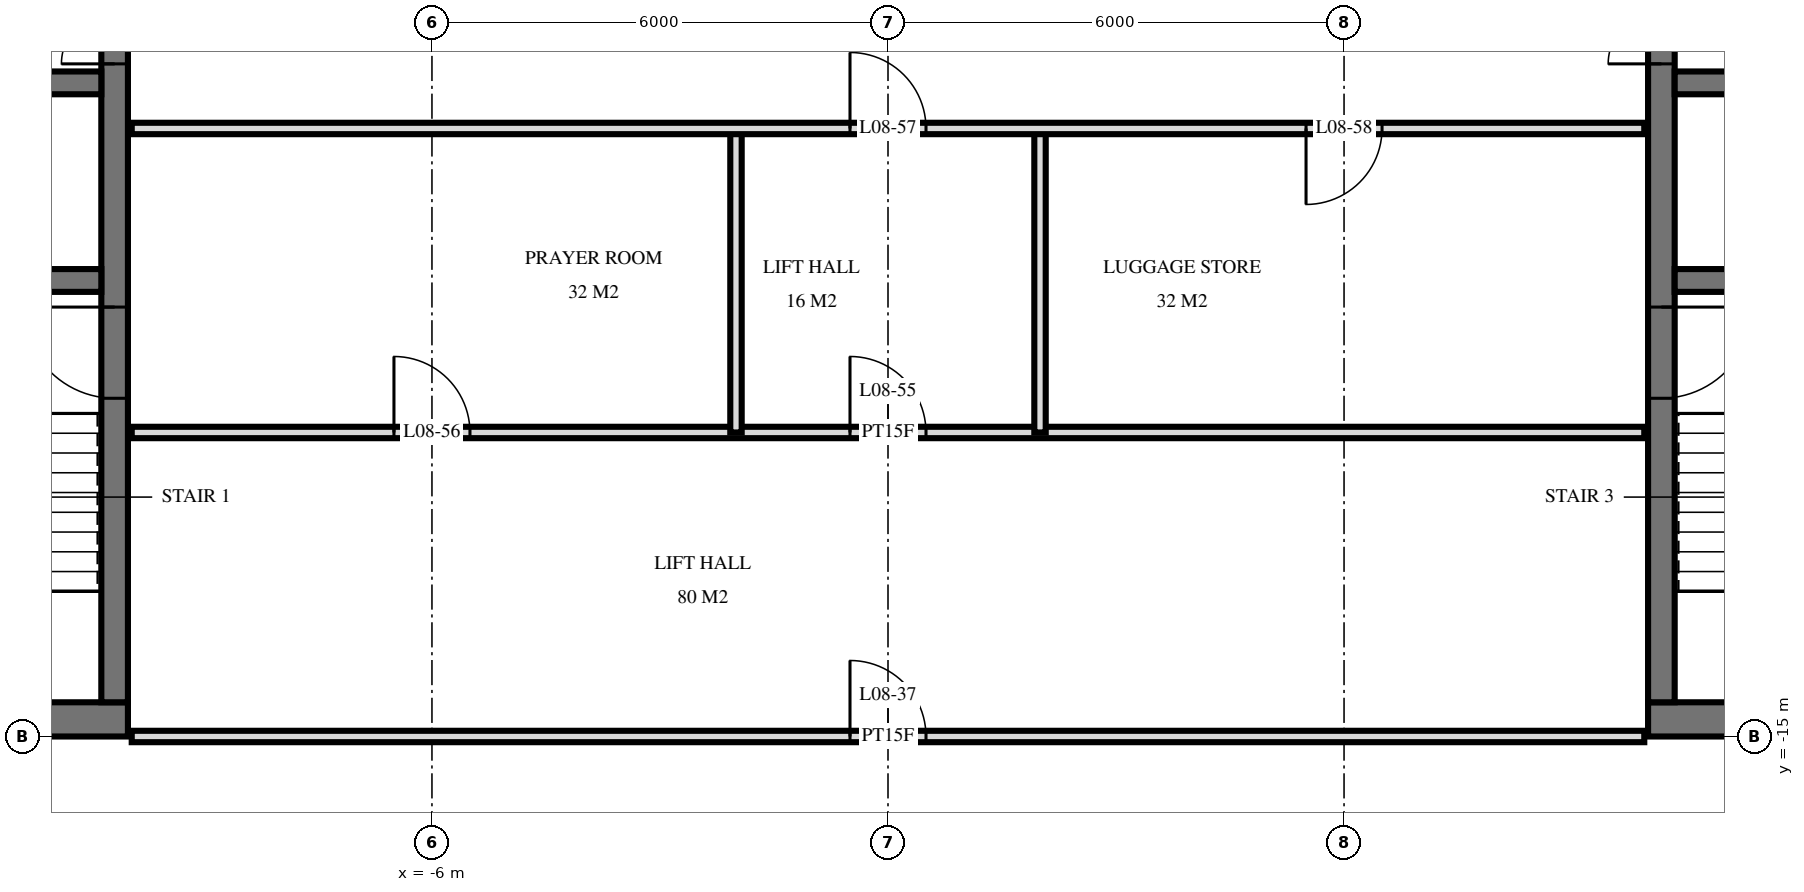
"""IFC4 building model, lengths in metres.
Left out: names, types, materials, properties, quantities, classifications, styles, units other than length and angle.
Written with IfcOpenShell. Run it as: python <this file> out.ifc"""

import sys

from ifc_helpers import new_model, si_unit, direction, frame, frame_2d, origin, place, context, subcontext, project, spatial, rectangle, extrude, element, fill, save


model = new_model("IFC4")
c1 = context("Model", 3, precision=1e-05, world=origin(), true_north=direction((0.0, 1.0)))
c2 = subcontext(c1, "Body", "Model", "MODEL_VIEW")
j1 = project(units=[si_unit("LENGTHUNIT", "METRE"), si_unit("PLANEANGLEUNIT", "RADIAN")], contexts=[c1])
p1 = place(None, origin())
s1 = spatial("IfcSite", under=j1, at=p1, CompositionType="ELEMENT")
p2 = place(p1, origin())
s2 = spatial("IfcBuilding", under=s1, at=p2, CompositionType="ELEMENT")
p3 = place(p2, frame((0.0, 0.0, 38.4)))
s3 = spatial("IfcBuildingStorey", under=s2, at=p3, CompositionType="ELEMENT", Elevation=38.4)
p4 = place(p3, frame((-29.5, -14.775, 0.0), z_axis=(0.0, 0.0, 1.0), x_axis=(1.0, 0.0, 0.0)))
e1 = element("IfcWall", 1, at=p4, inside=s3, PredefinedType="SHEAR", context=c2, shape_type="SweptSolid", body=[
    extrude(rectangle(XDim=19.5, YDim=0.45, at=frame_2d((9.75, 0.0))), origin(), (0.0, 0.0, 1.0), 3.6),
])
p5 = place(p4, frame((11.2, 0.0, 0.0)))
e2 = element("IfcOpeningElement", 2, at=p5, cuts=e1, PredefinedType="OPENING", context=c2, shape_type="SweptSolid", body=[
    extrude(rectangle(XDim=1.2, YDim=2.1, at=frame_2d((0.6, 1.05))), frame((0.0, 0.235, 0.0), z_axis=(0.0, -1.0, 0.0), x_axis=(1.0, 0.0, 0.0)), (0.0, 0.0, 1.0), 0.47),
])
p6 = place(p4, frame((14.25, 0.0, 0.0)))
e3 = element("IfcOpeningElement", 3, at=p6, cuts=e1, PredefinedType="OPENING", context=c2, shape_type="SweptSolid", body=[
    extrude(rectangle(XDim=1.1, YDim=2.1, at=frame_2d((0.55, 1.05))), frame((0.0, 0.235, 0.0), z_axis=(0.0, -1.0, 0.0), x_axis=(1.0, 0.0, 0.0)), (0.0, 0.0, 1.0), 0.47),
])
p7 = place(p4, frame((8.5, 0.0, 0.0)))
e4 = element("IfcOpeningElement", 4, at=p7, cuts=e1, PredefinedType="OPENING", context=c2, shape_type="SweptSolid", body=[
    extrude(rectangle(XDim=0.9, YDim=2.1, at=frame_2d((0.45, 1.05))), frame((0.0, 0.235, 0.0), z_axis=(0.0, -1.0, 0.0), x_axis=(1.0, 0.0, 0.0)), (0.0, 0.0, 1.0), 0.47),
])
p8 = place(p4, frame((6.05, 0.0, 0.0)))
e5 = element("IfcOpeningElement", 5, at=p8, cuts=e1, PredefinedType="OPENING", context=c2, shape_type="SweptSolid", body=[
    extrude(rectangle(XDim=1.0, YDim=2.1, at=frame_2d((0.5, 1.05))), frame((0.0, 0.235, 0.0), z_axis=(0.0, -1.0, 0.0), x_axis=(1.0, 0.0, 0.0)), (0.0, 0.0, 1.0), 0.47),
])
p9 = place(p4, frame((2.988, 0.0, 0.0)))
e6 = element("IfcOpeningElement", 6, at=p9, cuts=e1, PredefinedType="OPENING", context=c2, shape_type="SweptSolid", body=[
    extrude(rectangle(XDim=1.0, YDim=2.1, at=frame_2d((0.5, 1.05))), frame((0.0, 0.235, 0.0), z_axis=(0.0, -1.0, 0.0), x_axis=(1.0, 0.0, 0.0)), (0.0, 0.0, 1.0), 0.47),
])
p10 = place(p4, frame((0.663, 0.0, 0.0)))
e7 = element("IfcOpeningElement", 7, at=p10, cuts=e1, PredefinedType="OPENING", context=c2, shape_type="SweptSolid", body=[
    extrude(rectangle(XDim=1.0, YDim=2.1, at=frame_2d((0.5, 1.05))), frame((0.0, 0.235, 0.0), z_axis=(0.0, -1.0, 0.0), x_axis=(1.0, 0.0, 0.0)), (0.0, 0.0, 1.0), 0.47),
])
p11 = place(p3, frame((-10.175, -14.55, 0.0), z_axis=(0.0, 0.0, 1.0), x_axis=(0.0, 1.0, 0.0)))
e8 = element("IfcWall", 8, at=p11, inside=s3, PredefinedType="SHEAR", context=c2, shape_type="SweptSolid", body=[
    extrude(rectangle(XDim=14.1, YDim=0.35, at=frame_2d((7.05, 0.0))), origin(), (0.0, 0.0, 1.0), 3.6),
])
p12 = place(p11, frame((8.4, 0.0, 0.0)))
e9 = element("IfcOpeningElement", 9, at=p12, cuts=e8, PredefinedType="OPENING", context=c2, shape_type="SweptSolid", body=[
    extrude(rectangle(XDim=1.4, YDim=2.4, at=frame_2d((0.7, 1.2))), frame((0.0, 0.185, 0.0), z_axis=(0.0, -1.0, 0.0), x_axis=(1.0, 0.0, 0.0)), (0.0, 0.0, 1.0), 0.37),
])
p13 = place(p11, frame((10.0, 0.0, 0.0)))
e10 = element("IfcOpeningElement", 10, at=p13, cuts=e8, PredefinedType="OPENING", context=c2, shape_type="SweptSolid", body=[
    extrude(rectangle(XDim=1.4, YDim=2.4, at=frame_2d((0.7, 1.2))), frame((0.0, 0.185, 0.0), z_axis=(0.0, -1.0, 0.0), x_axis=(1.0, 0.0, 0.0)), (0.0, 0.0, 1.0), 0.37),
])
p14 = place(p11, frame((4.0, 0.0, 0.0)))
e11 = element("IfcOpeningElement", 11, at=p14, cuts=e8, PredefinedType="OPENING", context=c2, shape_type="SweptSolid", body=[
    extrude(rectangle(XDim=1.2, YDim=2.1, at=frame_2d((0.6, 1.05))), frame((0.0, 0.185, 0.0), z_axis=(0.0, -1.0, 0.0), x_axis=(1.0, 0.0, 0.0)), (0.0, 0.0, 1.0), 0.37),
])
p15 = place(p3, frame((-29.05, -6.4, 0.0), z_axis=(0.0, 0.0, 1.0), x_axis=(1.0, 0.0, 0.0)))
e12 = element("IfcWall", 12, at=p15, inside=s3, PredefinedType="SHEAR", context=c2, shape_type="SweptSolid", body=[
    extrude(rectangle(XDim=18.7, YDim=0.3, at=frame_2d((9.35, 0.0))), origin(), (0.0, 0.0, 1.0), 3.6),
])
p16 = place(p15, frame((2.95, 0.0, 0.0)))
e13 = element("IfcOpeningElement", 13, at=p16, cuts=e12, PredefinedType="OPENING", context=c2, shape_type="SweptSolid", body=[
    extrude(rectangle(XDim=1.1, YDim=2.1, at=frame_2d((0.55, 1.05))), frame((0.0, 0.16, 0.0), z_axis=(0.0, -1.0, 0.0), x_axis=(1.0, 0.0, 0.0)), (0.0, 0.0, 1.0), 0.32),
])
p17 = place(p15, frame((0.55, 0.0, 0.0)))
e14 = element("IfcOpeningElement", 14, at=p17, cuts=e12, PredefinedType="OPENING", context=c2, shape_type="SweptSolid", body=[
    extrude(rectangle(XDim=1.1, YDim=2.1, at=frame_2d((0.55, 1.05))), frame((0.0, 0.16, 0.0), z_axis=(0.0, -1.0, 0.0), x_axis=(1.0, 0.0, 0.0)), (0.0, 0.0, 1.0), 0.32),
])
p18 = place(p15, frame((10.8, 0.0, 0.0)))
e15 = element("IfcOpeningElement", 15, at=p18, cuts=e12, PredefinedType="OPENING", context=c2, shape_type="SweptSolid", body=[
    extrude(rectangle(XDim=1.1, YDim=2.1, at=frame_2d((0.55, 1.05))), frame((0.0, 0.16, 0.0), z_axis=(0.0, -1.0, 0.0), x_axis=(1.0, 0.0, 0.0)), (0.0, 0.0, 1.0), 0.32),
])
p19 = place(p15, frame((5.6, 0.0, 0.0)))
e16 = element("IfcOpeningElement", 16, at=p19, cuts=e12, PredefinedType="OPENING", context=c2, shape_type="SweptSolid", body=[
    extrude(rectangle(XDim=1.0, YDim=2.1, at=frame_2d((0.5, 1.05))), frame((0.0, 0.16, 0.0), z_axis=(0.0, -1.0, 0.0), x_axis=(1.0, 0.0, 0.0)), (0.0, 0.0, 1.0), 0.32),
])
p20 = place(p3, frame((-29.05, -9.0, 0.0), z_axis=(0.0, 0.0, 1.0), x_axis=(1.0, 0.0, 0.0)))
e17 = element("IfcWall", 17, at=p20, inside=s3, PredefinedType="SHEAR", context=c2, shape_type="SweptSolid", body=[
    extrude(rectangle(XDim=18.7, YDim=0.3, at=frame_2d((9.35, 0.0))), origin(), (0.0, 0.0, 1.0), 3.6),
])
p21 = place(p20, frame((13.8, 0.0, 0.0)))
e18 = element("IfcOpeningElement", 18, at=p21, cuts=e17, PredefinedType="OPENING", context=c2, shape_type="SweptSolid", body=[
    extrude(rectangle(XDim=1.1, YDim=2.1, at=frame_2d((0.55, 1.05))), frame((0.0, 0.16, 0.0), z_axis=(0.0, -1.0, 0.0), x_axis=(1.0, 0.0, 0.0)), (0.0, 0.0, 1.0), 0.32),
])
p22 = place(p3, frame((10.0, -14.775, 0.0), z_axis=(0.0, 0.0, 1.0), x_axis=(1.0, 0.0, 0.0)))
e19 = element("IfcWall", 19, at=p22, inside=s3, PredefinedType="SHEAR", context=c2, shape_type="SweptSolid", body=[
    extrude(rectangle(XDim=19.5, YDim=0.45, at=frame_2d((9.75, 0.0))), origin(), (0.0, 0.0, 1.0), 3.6),
])
p23 = place(p22, frame((7.1, 0.0, 0.0)))
e20 = element("IfcOpeningElement", 20, at=p23, cuts=e19, PredefinedType="OPENING", context=c2, shape_type="SweptSolid", body=[
    extrude(rectangle(XDim=1.2, YDim=2.1, at=frame_2d((0.6, 1.05))), frame((0.0, 0.235, 0.0), z_axis=(0.0, -1.0, 0.0), x_axis=(1.0, 0.0, 0.0)), (0.0, 0.0, 1.0), 0.47),
])
p24 = place(p22, frame((4.15, 0.0, 0.0)))
e21 = element("IfcOpeningElement", 21, at=p24, cuts=e19, PredefinedType="OPENING", context=c2, shape_type="SweptSolid", body=[
    extrude(rectangle(XDim=1.1, YDim=2.1, at=frame_2d((0.55, 1.05))), frame((0.0, 0.235, 0.0), z_axis=(0.0, -1.0, 0.0), x_axis=(1.0, 0.0, 0.0)), (0.0, 0.0, 1.0), 0.47),
])
p25 = place(p22, frame((10.1, 0.0, 0.0)))
e22 = element("IfcOpeningElement", 22, at=p25, cuts=e19, PredefinedType="OPENING", context=c2, shape_type="SweptSolid", body=[
    extrude(rectangle(XDim=0.9, YDim=2.1, at=frame_2d((0.45, 1.05))), frame((0.0, 0.235, 0.0), z_axis=(0.0, -1.0, 0.0), x_axis=(1.0, 0.0, 0.0)), (0.0, 0.0, 1.0), 0.47),
])
p26 = place(p22, frame((12.45, 0.0, 0.0)))
e23 = element("IfcOpeningElement", 23, at=p26, cuts=e19, PredefinedType="OPENING", context=c2, shape_type="SweptSolid", body=[
    extrude(rectangle(XDim=1.0, YDim=2.1, at=frame_2d((0.5, 1.05))), frame((0.0, 0.235, 0.0), z_axis=(0.0, -1.0, 0.0), x_axis=(1.0, 0.0, 0.0)), (0.0, 0.0, 1.0), 0.47),
])
p27 = place(p22, frame((15.512, 0.0, 0.0)))
e24 = element("IfcOpeningElement", 24, at=p27, cuts=e19, PredefinedType="OPENING", context=c2, shape_type="SweptSolid", body=[
    extrude(rectangle(XDim=1.0, YDim=2.1, at=frame_2d((0.5, 1.05))), frame((0.0, 0.235, 0.0), z_axis=(0.0, -1.0, 0.0), x_axis=(1.0, 0.0, 0.0)), (0.0, 0.0, 1.0), 0.47),
])
p28 = place(p22, frame((17.837, 0.0, 0.0)))
e25 = element("IfcOpeningElement", 25, at=p28, cuts=e19, PredefinedType="OPENING", context=c2, shape_type="SweptSolid", body=[
    extrude(rectangle(XDim=1.0, YDim=2.1, at=frame_2d((0.5, 1.05))), frame((0.0, 0.235, 0.0), z_axis=(0.0, -1.0, 0.0), x_axis=(1.0, 0.0, 0.0)), (0.0, 0.0, 1.0), 0.47),
])
p29 = place(p3, frame((10.175, -14.55, 0.0), z_axis=(0.0, 0.0, 1.0), x_axis=(0.0, 1.0, 0.0)))
e26 = element("IfcWall", 26, at=p29, inside=s3, PredefinedType="SHEAR", context=c2, shape_type="SweptSolid", body=[
    extrude(rectangle(XDim=14.1, YDim=0.35, at=frame_2d((7.05, 0.0))), origin(), (0.0, 0.0, 1.0), 3.6),
])
p30 = place(p29, frame((8.4, 0.0, 0.0)))
e27 = element("IfcOpeningElement", 27, at=p30, cuts=e26, PredefinedType="OPENING", context=c2, shape_type="SweptSolid", body=[
    extrude(rectangle(XDim=1.4, YDim=2.4, at=frame_2d((0.7, 1.2))), frame((0.0, 0.185, 0.0), z_axis=(0.0, -1.0, 0.0), x_axis=(1.0, 0.0, 0.0)), (0.0, 0.0, 1.0), 0.37),
])
p31 = place(p29, frame((10.0, 0.0, 0.0)))
e28 = element("IfcOpeningElement", 28, at=p31, cuts=e26, PredefinedType="OPENING", context=c2, shape_type="SweptSolid", body=[
    extrude(rectangle(XDim=1.4, YDim=2.4, at=frame_2d((0.7, 1.2))), frame((0.0, 0.185, 0.0), z_axis=(0.0, -1.0, 0.0), x_axis=(1.0, 0.0, 0.0)), (0.0, 0.0, 1.0), 0.37),
])
p32 = place(p29, frame((4.0, 0.0, 0.0)))
e29 = element("IfcOpeningElement", 29, at=p32, cuts=e26, PredefinedType="OPENING", context=c2, shape_type="SweptSolid", body=[
    extrude(rectangle(XDim=1.2, YDim=2.1, at=frame_2d((0.6, 1.05))), frame((0.0, 0.185, 0.0), z_axis=(0.0, -1.0, 0.0), x_axis=(1.0, 0.0, 0.0)), (0.0, 0.0, 1.0), 0.37),
])
p33 = place(p3, frame((10.35, -6.4, 0.0), z_axis=(0.0, 0.0, 1.0), x_axis=(1.0, 0.0, 0.0)))
e30 = element("IfcWall", 30, at=p33, inside=s3, PredefinedType="SHEAR", context=c2, shape_type="SweptSolid", body=[
    extrude(rectangle(XDim=18.7, YDim=0.3, at=frame_2d((9.35, 0.0))), origin(), (0.0, 0.0, 1.0), 3.6),
])
p34 = place(p33, frame((14.65, 0.0, 0.0)))
e31 = element("IfcOpeningElement", 31, at=p34, cuts=e30, PredefinedType="OPENING", context=c2, shape_type="SweptSolid", body=[
    extrude(rectangle(XDim=1.1, YDim=2.1, at=frame_2d((0.55, 1.05))), frame((0.0, 0.16, 0.0), z_axis=(0.0, -1.0, 0.0), x_axis=(1.0, 0.0, 0.0)), (0.0, 0.0, 1.0), 0.32),
])
p35 = place(p33, frame((17.05, 0.0, 0.0)))
e32 = element("IfcOpeningElement", 32, at=p35, cuts=e30, PredefinedType="OPENING", context=c2, shape_type="SweptSolid", body=[
    extrude(rectangle(XDim=1.1, YDim=2.1, at=frame_2d((0.55, 1.05))), frame((0.0, 0.16, 0.0), z_axis=(0.0, -1.0, 0.0), x_axis=(1.0, 0.0, 0.0)), (0.0, 0.0, 1.0), 0.32),
])
p36 = place(p33, frame((6.8, 0.0, 0.0)))
e33 = element("IfcOpeningElement", 33, at=p36, cuts=e30, PredefinedType="OPENING", context=c2, shape_type="SweptSolid", body=[
    extrude(rectangle(XDim=1.1, YDim=2.1, at=frame_2d((0.55, 1.05))), frame((0.0, 0.16, 0.0), z_axis=(0.0, -1.0, 0.0), x_axis=(1.0, 0.0, 0.0)), (0.0, 0.0, 1.0), 0.32),
])
p37 = place(p33, frame((12.1, 0.0, 0.0)))
e34 = element("IfcOpeningElement", 34, at=p37, cuts=e30, PredefinedType="OPENING", context=c2, shape_type="SweptSolid", body=[
    extrude(rectangle(XDim=1.0, YDim=2.1, at=frame_2d((0.5, 1.05))), frame((0.0, 0.16, 0.0), z_axis=(0.0, -1.0, 0.0), x_axis=(1.0, 0.0, 0.0)), (0.0, 0.0, 1.0), 0.32),
])
p38 = place(p3, frame((10.35, -9.0, 0.0), z_axis=(0.0, 0.0, 1.0), x_axis=(1.0, 0.0, 0.0)))
e35 = element("IfcWall", 35, at=p38, inside=s3, PredefinedType="SHEAR", context=c2, shape_type="SweptSolid", body=[
    extrude(rectangle(XDim=18.7, YDim=0.3, at=frame_2d((9.35, 0.0))), origin(), (0.0, 0.0, 1.0), 3.6),
])
p39 = place(p38, frame((3.8, 0.0, 0.0)))
e36 = element("IfcOpeningElement", 36, at=p39, cuts=e35, PredefinedType="OPENING", context=c2, shape_type="SweptSolid", body=[
    extrude(rectangle(XDim=1.1, YDim=2.1, at=frame_2d((0.55, 1.05))), frame((0.0, 0.16, 0.0), z_axis=(0.0, -1.0, 0.0), x_axis=(1.0, 0.0, 0.0)), (0.0, 0.0, 1.0), 0.32),
])
for number, where, z_axis, x_axis in (
    (37, (2.0, -11.0, 0.0), (0.0, 0.0, 1.0), (0.0, 1.0, 0.0)),
    (38, (-2.0, -11.0, 0.0), (0.0, 0.0, 1.0), (0.0, 1.0, 0.0)),
):
    element("IfcWall", number, at=place(p3, frame(where, z_axis=z_axis, x_axis=x_axis)), inside=s3, PredefinedType="PARTITIONING", context=c2, shape_type="SweptSolid", body=[
        extrude(rectangle(XDim=4.0, YDim=0.15, at=frame_2d((2.0, 0.0))), origin(), (0.0, 0.0, 1.0), 3.32),
    ])
p40 = place(p3, frame((-9.95, -15.0, 0.0), z_axis=(0.0, 0.0, 1.0), x_axis=(1.0, 0.0, 0.0)))
e39 = element("IfcWall", 39, at=p40, inside=s3, PredefinedType="PARTITIONING", context=c2, shape_type="SweptSolid", body=[
    extrude(rectangle(XDim=19.9, YDim=0.15, at=frame_2d((9.95, 0.0))), origin(), (0.0, 0.0, 1.0), 2.684),
])
p41 = place(p40, frame((9.45, 0.0, 0.0)))
e40 = element("IfcOpeningElement", 40, at=p41, cuts=e39, PredefinedType="OPENING", context=c2, shape_type="SweptSolid", body=[
    extrude(rectangle(XDim=1.0, YDim=2.1, at=frame_2d((0.5, 1.05))), frame((0.0, 0.085, 0.0), z_axis=(0.0, -1.0, 0.0), x_axis=(1.0, 0.0, 0.0)), (0.0, 0.0, 1.0), 0.17),
])
p42 = place(p3, frame((-9.95, -11.0, 0.0), z_axis=(0.0, 0.0, 1.0), x_axis=(1.0, 0.0, 0.0)))
e41 = element("IfcWall", 41, at=p42, inside=s3, PredefinedType="PARTITIONING", context=c2, shape_type="SweptSolid", body=[
    extrude(rectangle(XDim=19.9, YDim=0.15, at=frame_2d((9.95, 0.0))), origin(), (0.0, 0.0, 1.0), 3.32),
])
p43 = place(p42, frame((9.45, 0.0, 0.0)))
e42 = element("IfcOpeningElement", 42, at=p43, cuts=e41, PredefinedType="OPENING", context=c2, shape_type="SweptSolid", body=[
    extrude(rectangle(XDim=1.0, YDim=2.1, at=frame_2d((0.5, 1.05))), frame((0.0, 0.085, 0.0), z_axis=(0.0, -1.0, 0.0), x_axis=(1.0, 0.0, 0.0)), (0.0, 0.0, 1.0), 0.17),
])
p44 = place(p42, frame((3.45, 0.0, 0.0)))
e43 = element("IfcOpeningElement", 43, at=p44, cuts=e41, PredefinedType="OPENING", context=c2, shape_type="SweptSolid", body=[
    extrude(rectangle(XDim=1.0, YDim=2.1, at=frame_2d((0.5, 1.05))), frame((0.0, 0.085, 0.0), z_axis=(0.0, -1.0, 0.0), x_axis=(1.0, 0.0, 0.0)), (0.0, 0.0, 1.0), 0.17),
])
p45 = place(p3, frame((-9.95, -7.0, 0.0), z_axis=(0.0, 0.0, 1.0), x_axis=(1.0, 0.0, 0.0)))
e44 = element("IfcWall", 44, at=p45, inside=s3, PredefinedType="PARTITIONING", context=c2, shape_type="SweptSolid", body=[
    extrude(rectangle(XDim=19.9, YDim=0.15, at=frame_2d((9.95, 0.0))), origin(), (0.0, 0.0, 1.0), 3.32),
])
p46 = place(p45, frame((9.45, 0.0, 0.0)))
e45 = element("IfcOpeningElement", 45, at=p46, cuts=e44, PredefinedType="OPENING", context=c2, shape_type="SweptSolid", body=[
    extrude(rectangle(XDim=1.0, YDim=2.1, at=frame_2d((0.5, 1.05))), frame((0.0, 0.085, 0.0), z_axis=(0.0, -1.0, 0.0), x_axis=(1.0, 0.0, 0.0)), (0.0, 0.0, 1.0), 0.17),
])
p47 = place(p45, frame((15.45, 0.0, 0.0)))
e46 = element("IfcOpeningElement", 46, at=p47, cuts=e44, PredefinedType="OPENING", context=c2, shape_type="SweptSolid", body=[
    extrude(rectangle(XDim=1.0, YDim=2.1, at=frame_2d((0.5, 1.05))), frame((0.0, 0.085, 0.0), z_axis=(0.0, -1.0, 0.0), x_axis=(1.0, 0.0, 0.0)), (0.0, 0.0, 1.0), 0.17),
])
p48 = place(p12, origin())
e47 = element("IfcDoor", 47, at=p48, inside=s3, OperationType="DOUBLE_DOOR_SINGLE_SWING", PredefinedType="DOOR", context=c2, shape_type="SweptSolid", body=[
    extrude(rectangle(XDim=1.4, YDim=2.4, at=frame_2d((0.7, 1.2))), frame((0.0, 0.025, 0.0), z_axis=(0.0, -1.0, 0.0), x_axis=(1.0, 0.0, 0.0)), (0.0, 0.0, 1.0), 0.05),
])
fill(e9, e47)
p49 = place(p14, origin())
e48 = element("IfcDoor", 48, at=p49, inside=s3, OperationType="SINGLE_SWING_LEFT", PredefinedType="DOOR", context=c2, shape_type="SweptSolid", body=[
    extrude(rectangle(XDim=1.2, YDim=2.1, at=frame_2d((0.6, 1.05))), frame((0.0, 0.025, 0.0), z_axis=(0.0, -1.0, 0.0), x_axis=(1.0, 0.0, 0.0)), (0.0, 0.0, 1.0), 0.05),
])
fill(e11, e48)
p50 = place(p30, origin())
e49 = element("IfcDoor", 49, at=p50, inside=s3, OperationType="DOUBLE_DOOR_SINGLE_SWING", PredefinedType="DOOR", context=c2, shape_type="SweptSolid", body=[
    extrude(rectangle(XDim=1.4, YDim=2.4, at=frame_2d((0.7, 1.2))), frame((0.0, 0.025, 0.0), z_axis=(0.0, -1.0, 0.0), x_axis=(1.0, 0.0, 0.0)), (0.0, 0.0, 1.0), 0.05),
])
fill(e27, e49)
p51 = place(p32, frame((0.6, 0.0, 0.0), z_axis=(0.0, 0.0, 1.0), x_axis=(-1.0, 0.0, 0.0)))
e50 = element("IfcDoor", 50, at=p51, inside=s3, OperationType="SINGLE_SWING_RIGHT", PredefinedType="DOOR", context=c2, shape_type="SweptSolid", body=[
    extrude(rectangle(XDim=1.2, YDim=2.1, at=frame_2d((0.0, 1.05))), frame((0.0, -0.025, 0.0), z_axis=(0.0, 1.0, 0.0), x_axis=(-1.0, 0.0, 0.0)), (0.0, 0.0, 1.0), 0.05),
])
fill(e29, e50)
p52 = place(p41, origin())
e51 = element("IfcDoor", 51, at=p52, inside=s3, OperationType="SINGLE_SWING_RIGHT", PredefinedType="DOOR", context=c2, shape_type="SweptSolid", body=[
    extrude(rectangle(XDim=1.0, YDim=2.1, at=frame_2d((0.5, 1.05))), frame((0.0, 0.025, 0.0), z_axis=(0.0, -1.0, 0.0), x_axis=(1.0, 0.0, 0.0)), (0.0, 0.0, 1.0), 0.05),
])
fill(e40, e51)
p53 = place(p43, origin())
e52 = element("IfcDoor", 52, at=p53, inside=s3, OperationType="SINGLE_SWING_RIGHT", PredefinedType="DOOR", context=c2, shape_type="SweptSolid", body=[
    extrude(rectangle(XDim=1.0, YDim=2.1, at=frame_2d((0.5, 1.05))), frame((0.0, 0.025, 0.0), z_axis=(0.0, -1.0, 0.0), x_axis=(1.0, 0.0, 0.0)), (0.0, 0.0, 1.0), 0.05),
])
fill(e42, e52)
p54 = place(p44, origin())
e53 = element("IfcDoor", 53, at=p54, inside=s3, OperationType="SINGLE_SWING_RIGHT", PredefinedType="DOOR", context=c2, shape_type="SweptSolid", body=[
    extrude(rectangle(XDim=1.0, YDim=2.1, at=frame_2d((0.5, 1.05))), frame((0.0, 0.025, 0.0), z_axis=(0.0, -1.0, 0.0), x_axis=(1.0, 0.0, 0.0)), (0.0, 0.0, 1.0), 0.05),
])
fill(e43, e53)
p55 = place(p46, origin())
e54 = element("IfcDoor", 54, at=p55, inside=s3, OperationType="SINGLE_SWING_RIGHT", PredefinedType="DOOR", context=c2, shape_type="SweptSolid", body=[
    extrude(rectangle(XDim=1.0, YDim=2.1, at=frame_2d((0.5, 1.05))), frame((0.0, 0.025, 0.0), z_axis=(0.0, -1.0, 0.0), x_axis=(1.0, 0.0, 0.0)), (0.0, 0.0, 1.0), 0.05),
])
fill(e45, e54)
p56 = place(p47, frame((0.5, 0.0, 0.0), z_axis=(0.0, 0.0, 1.0), x_axis=(-1.0, 0.0, 0.0)))
e55 = element("IfcDoor", 55, at=p56, inside=s3, OperationType="SINGLE_SWING_LEFT", PredefinedType="DOOR", context=c2, shape_type="SweptSolid", body=[
    extrude(rectangle(XDim=1.0, YDim=2.1, at=frame_2d((0.0, 1.05))), frame((0.0, -0.025, 0.0), z_axis=(0.0, 1.0, 0.0), x_axis=(-1.0, 0.0, 0.0)), (0.0, 0.0, 1.0), 0.05),
])
fill(e46, e55)
save(model, sys.argv[1])
